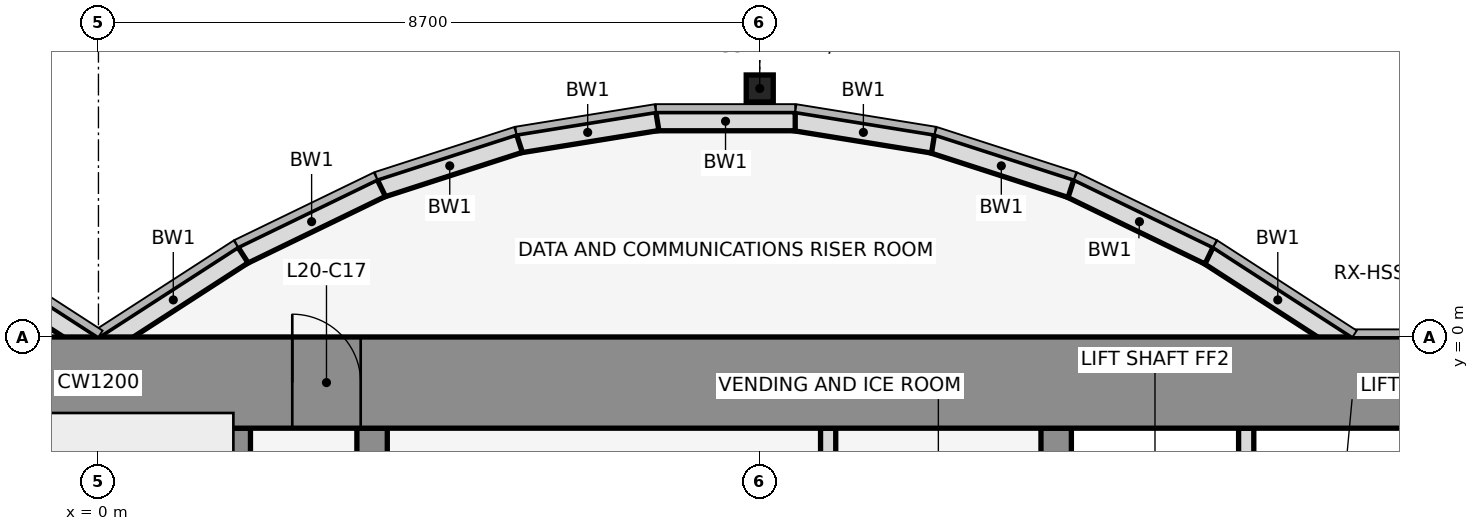
"""IFC4 building model, lengths in metres.
Left out: names, types, materials, properties, quantities, classifications, styles, units other than length and angle.
Written with IfcOpenShell. Run it as: python <this file> out.ifc"""

import sys

from ifc_helpers import new_model, si_unit, direction, frame, frame_2d, origin, origin_2d, place, context, subcontext, project, spatial, rectangle, hollow_rectangle, extrude, element, fill, save


model = new_model("IFC4")
c1 = context("Model", 3, precision=1e-05, world=origin(), true_north=direction((0.0, 1.0)))
c2 = subcontext(c1, "Body", "Model", "MODEL_VIEW")
j1 = project(units=[si_unit("LENGTHUNIT", "METRE"), si_unit("PLANEANGLEUNIT", "RADIAN")], contexts=[c1])
p1 = place(None, origin())
s1 = spatial("IfcSite", under=j1, at=p1, CompositionType="ELEMENT")
p2 = place(p1, origin())
s2 = spatial("IfcBuilding", under=s1, at=p2, CompositionType="ELEMENT")
p3 = place(p2, frame((0.0, 0.0, 98.1)))
s3 = spatial("IfcBuildingStorey", under=s2, at=p3, CompositionType="ELEMENT", Elevation=98.1)
p4 = place(p3, frame((8.7, 3.269, 0.0), z_axis=(0.0, 0.0, 1.0), x_axis=(1.0, 0.0, 0.0)))
e1 = element("IfcColumn", 1, at=p4, inside=s3, PredefinedType="COLUMN", context=c2, shape_type="SweptSolid", body=[
    extrude(hollow_rectangle(XDim=0.356, YDim=0.356, WallThickness=0.012, at=origin_2d()), origin(), (0.0, 0.0, 1.0), 4.1),
])
p5 = place(p3, frame((16.432, -0.105, 0.0), z_axis=(0.0, 0.0, 1.0), x_axis=(-0.83981312244, 0.542875602121, 0.0)))
e2 = element("IfcWall", 2, at=p5, inside=s3, PredefinedType="STANDARD", context=c2, shape_type="SweptSolid", body=[
    extrude(rectangle(XDim=2.183, YDim=0.25, at=frame_2d((1.091, 0.0))), origin(), (0.0, 0.0, 1.0), 3.95),
])
p6 = place(p3, frame((14.612, 1.073, 0.0), z_axis=(0.0, 0.0, 1.0), x_axis=(-0.89982408427, 0.436252928206, 0.0)))
e3 = element("IfcWall", 3, at=p6, inside=s3, PredefinedType="STANDARD", context=c2, shape_type="SweptSolid", body=[
    extrude(rectangle(XDim=2.038, YDim=0.25, at=frame_2d((1.019, 0.0))), origin(), (0.0, 0.0, 1.0), 3.95),
])
p7 = place(p3, frame((12.795, 1.955, 0.0), z_axis=(0.0, 0.0, 1.0), x_axis=(-0.951495806175, 0.307661714928, 0.0)))
e4 = element("IfcWall", 4, at=p7, inside=s3, PredefinedType="STANDARD", context=c2, shape_type="SweptSolid", body=[
    extrude(rectangle(XDim=1.927, YDim=0.25, at=frame_2d((0.963, 0.0))), origin(), (0.0, 0.0, 1.0), 3.95),
])
p8 = place(p3, frame((10.98, 2.543, 0.0), z_axis=(0.0, 0.0, 1.0), x_axis=(-0.987181718931, 0.159600293885, 0.0)))
e5 = element("IfcWall", 5, at=p8, inside=s3, PredefinedType="STANDARD", context=c2, shape_type="SweptSolid", body=[
    extrude(rectangle(XDim=1.857, YDim=0.25, at=frame_2d((0.929, 0.0))), origin(), (0.0, 0.0, 1.0), 3.95),
])
p9 = place(p3, frame((9.167, 2.838, 0.0), z_axis=(0.0, 0.0, 1.0), x_axis=(-1.0, 0.0, 0.0)))
e6 = element("IfcWall", 6, at=p9, inside=s3, PredefinedType="STANDARD", context=c2, shape_type="SweptSolid", body=[
    extrude(rectangle(XDim=1.833, YDim=0.25, at=frame_2d((0.917, 0.0))), origin(), (0.0, 0.0, 1.0), 3.95),
])
p10 = place(p3, frame((7.353, 2.84, 0.0), z_axis=(0.0, 0.0, 1.0), x_axis=(-0.987181718931, -0.159600293885, 0.0)))
e7 = element("IfcWall", 7, at=p10, inside=s3, PredefinedType="STANDARD", context=c2, shape_type="SweptSolid", body=[
    extrude(rectangle(XDim=1.857, YDim=0.25, at=frame_2d((0.929, 0.0))), origin(), (0.0, 0.0, 1.0), 3.95),
])
p11 = place(p3, frame((5.538, 2.548, 0.0), z_axis=(0.0, 0.0, 1.0), x_axis=(-0.951495806175, -0.307661714928, 0.0)))
e8 = element("IfcWall", 8, at=p11, inside=s3, PredefinedType="STANDARD", context=c2, shape_type="SweptSolid", body=[
    extrude(rectangle(XDim=1.927, YDim=0.25, at=frame_2d((0.963, 0.0))), origin(), (0.0, 0.0, 1.0), 3.95),
])
p12 = place(p3, frame((3.721, 1.962, 0.0), z_axis=(0.0, 0.0, 1.0), x_axis=(-0.89982408427, -0.436252928206, 0.0)))
e9 = element("IfcWall", 9, at=p12, inside=s3, PredefinedType="STANDARD", context=c2, shape_type="SweptSolid", body=[
    extrude(rectangle(XDim=2.038, YDim=0.25, at=frame_2d((1.019, 0.0))), origin(), (0.0, 0.0, 1.0), 3.95),
])
for number, where, z_axis, x_axis in (
    (10, (1.901, 1.08, 0.0), (0.0, 0.0, 1.0), (-0.84, -0.543, 0.0)),
    (11, (-0.068, -0.105, 0.0), (0.0, 0.0, 1.0), (-0.84, 0.543, 0.0)),
):
    element("IfcWall", number, at=place(p3, frame(where, z_axis=z_axis, x_axis=x_axis)), inside=s3, PredefinedType="STANDARD", context=c2, shape_type="SweptSolid", body=[
        extrude(rectangle(XDim=2.183, YDim=0.25, at=frame_2d((1.091, 0.0))), origin(), (0.0, 0.0, 1.0), 3.95),
    ])
p13 = place(p3, frame((1.8, -11.8, 0.0), z_axis=(0.0, 0.0, 1.0), x_axis=(0.0, 1.0, 0.0)))
e12 = element("IfcWall", 12, at=p13, inside=s3, PredefinedType="SHEAR", context=c2, shape_type="SweptSolid", body=[
    extrude(rectangle(XDim=10.6, YDim=0.4, at=frame_2d((5.3, 0.0))), origin(), (0.0, 0.0, 1.0), 4.1),
])
p14 = place(p3, frame((3.6, -11.8, 0.0), z_axis=(0.0, 0.0, 1.0), x_axis=(0.0, 1.0, 0.0)))
e13 = element("IfcWall", 13, at=p14, inside=s3, PredefinedType="SHEAR", context=c2, shape_type="SweptSolid", body=[
    extrude(rectangle(XDim=10.6, YDim=0.4, at=frame_2d((5.3, 0.0))), origin(), (0.0, 0.0, 1.0), 4.1),
])
p15 = place(p14, frame((1.35, 0.0, 0.0)))
e14 = element("IfcOpeningElement", 14, at=p15, cuts=e13, PredefinedType="OPENING", context=c2, shape_type="SweptSolid", body=[
    extrude(rectangle(XDim=0.9, YDim=2.1, at=frame_2d((0.45, 1.05))), frame((0.0, 0.212, 0.0), z_axis=(0.0, -1.0, 0.0), x_axis=(1.0, 0.0, 0.0)), (0.0, 0.0, 1.0), 0.424),
])
p16 = place(p3, frame((9.6, -4.6, 0.0), z_axis=(0.0, 0.0, 1.0), x_axis=(0.0, 1.0, 0.0)))
e15 = element("IfcWall", 15, at=p16, inside=s3, PredefinedType="PARTITIONING", context=c2, shape_type="SweptSolid", body=[
    extrude(rectangle(XDim=3.4, YDim=0.2, at=frame_2d((1.7, 0.0))), origin(), (0.0, 0.0, 1.0), 3.018),
])
p17 = place(p3, frame((12.6, -11.8, 0.0), z_axis=(0.0, 0.0, 1.0), x_axis=(0.0, 1.0, 0.0)))
e16 = element("IfcWall", 16, at=p17, inside=s3, PredefinedType="SHEAR", context=c2, shape_type="SweptSolid", body=[
    extrude(rectangle(XDim=10.6, YDim=0.4, at=frame_2d((5.3, 0.0))), origin(), (0.0, 0.0, 1.0), 4.1),
])
p18 = place(p17, frame((4.75, 0.0, 0.0)))
e17 = element("IfcOpeningElement", 17, at=p18, cuts=e16, PredefinedType="OPENING", context=c2, shape_type="SweptSolid", body=[
    extrude(rectangle(XDim=1.1, YDim=2.1, at=frame_2d((0.55, 1.05))), frame((0.0, 0.212, 0.0), z_axis=(0.0, -1.0, 0.0), x_axis=(1.0, 0.0, 0.0)), (0.0, 0.0, 1.0), 0.424),
])
p19 = place(p3, frame((15.1, -4.6, 0.0), z_axis=(0.0, 0.0, 1.0), x_axis=(0.0, 1.0, 0.0)))
e18 = element("IfcWall", 18, at=p19, inside=s3, PredefinedType="PARTITIONING", context=c2, shape_type="SweptSolid", body=[
    extrude(rectangle(XDim=3.4, YDim=0.2, at=frame_2d((1.7, 0.0))), origin(), (0.0, 0.0, 1.0), 3.018),
])
p20 = place(p3, frame((-22.0, -0.6, 0.0), z_axis=(0.0, 0.0, 1.0), x_axis=(1.0, 0.0, 0.0)))
e19 = element("IfcWall", 19, at=p20, inside=s3, PredefinedType="SHEAR", context=c2, shape_type="SweptSolid", body=[
    extrude(rectangle(XDim=44.0, YDim=1.2, at=frame_2d((22.0, 0.0))), origin(), (0.0, 0.0, 1.0), 4.1),
])
p21 = place(p20, frame((18.55, 0.0, 0.0)))
e20 = element("IfcOpeningElement", 20, at=p21, cuts=e19, PredefinedType="OPENING", context=c2, shape_type="SweptSolid", body=[
    extrude(rectangle(XDim=0.9, YDim=2.1, at=frame_2d((0.45, 1.05))), frame((0.0, 0.612, 0.0), z_axis=(0.0, -1.0, 0.0), x_axis=(1.0, 0.0, 0.0)), (0.0, 0.0, 1.0), 1.224),
])
p22 = place(p20, frame((24.55, 0.0, 0.0)))
e21 = element("IfcOpeningElement", 21, at=p22, cuts=e19, PredefinedType="OPENING", context=c2, shape_type="SweptSolid", body=[
    extrude(rectangle(XDim=0.9, YDim=2.1, at=frame_2d((0.45, 1.05))), frame((0.0, 0.612, 0.0), z_axis=(0.0, -1.0, 0.0), x_axis=(1.0, 0.0, 0.0)), (0.0, 0.0, 1.0), 1.224),
])
p23 = place(p22, origin())
e22 = element("IfcDoor", 22, at=p23, inside=s3, OperationType="SINGLE_SWING_LEFT", PredefinedType="DOOR", context=c2, shape_type="SweptSolid", body=[
    extrude(rectangle(XDim=0.9, YDim=2.1, at=frame_2d((0.45, 1.05))), frame((0.0, 0.025, 0.0), z_axis=(0.0, -1.0, 0.0), x_axis=(1.0, 0.0, 0.0)), (0.0, 0.0, 1.0), 0.05),
])
fill(e21, e22)
save(model, sys.argv[1])
